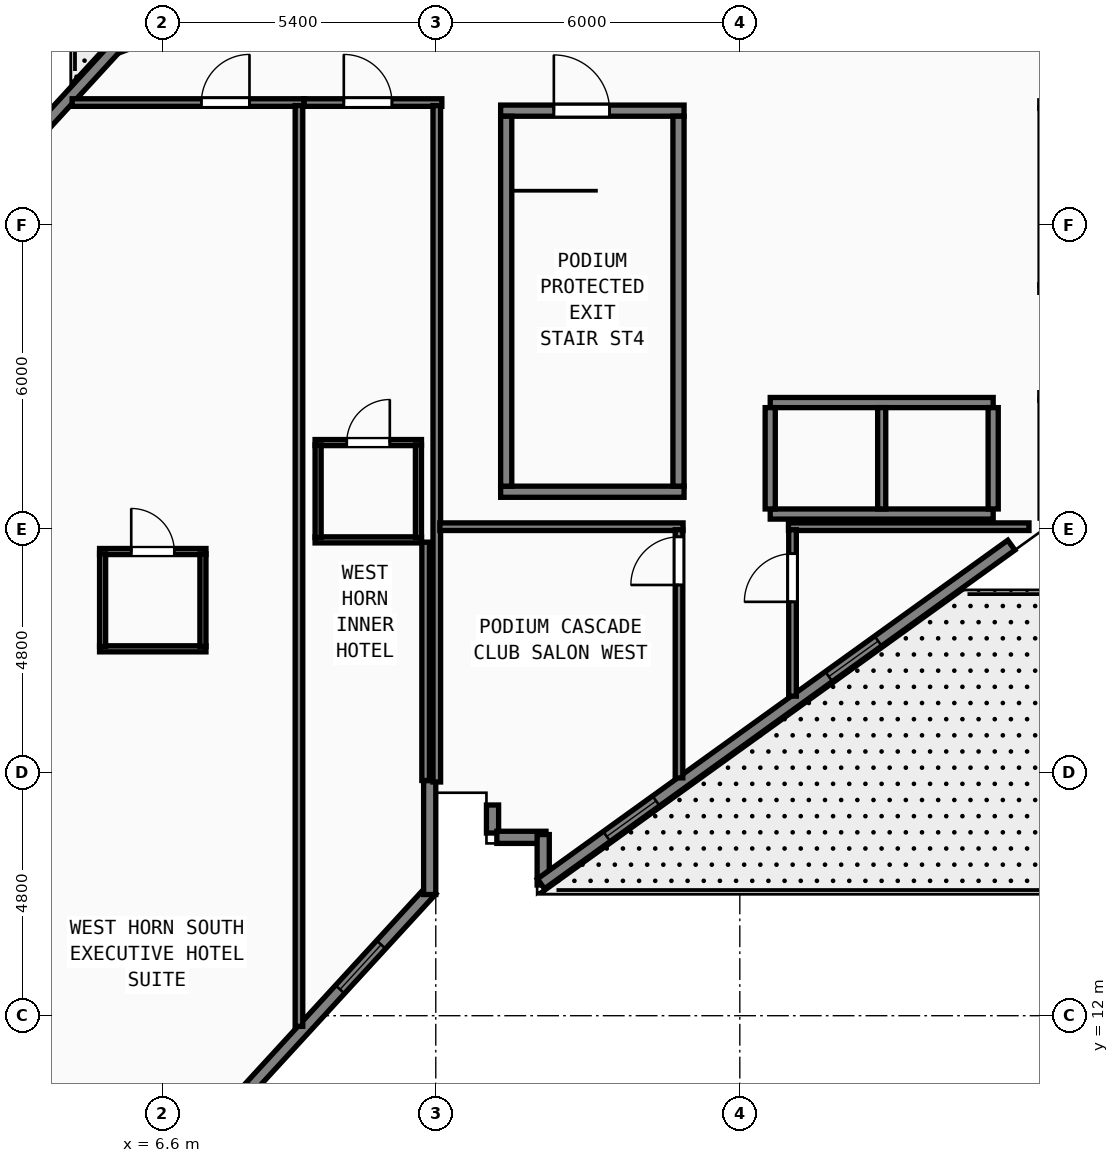
"""IFC4 building model, lengths in metres.
Left out: names, types, materials, properties, quantities, classifications, styles, units other than length and angle.
Written with IfcOpenShell. Run it as: python <this file> out.ifc"""

import sys

from ifc_helpers import new_model, si_unit, direction, frame, frame_2d, origin, origin_2d, place, context, subcontext, project, spatial, rectangle, hollow_rectangle, extrude, element, fill, save


model = new_model("IFC4")
c1 = context("Model", 3, precision=1e-05, world=origin(), true_north=direction((0.0, 1.0)))
c2 = subcontext(c1, "Body", "Model", "MODEL_VIEW")
j1 = project(units=[si_unit("LENGTHUNIT", "METRE"), si_unit("PLANEANGLEUNIT", "RADIAN")], contexts=[c1])
p1 = place(None, origin())
s1 = spatial("IfcSite", under=j1, at=p1, CompositionType="ELEMENT")
p2 = place(p1, origin())
s2 = spatial("IfcBuilding", under=s1, at=p2, CompositionType="ELEMENT")
p3 = place(p2, frame((0.0, 0.0, 24.0)))
s3 = spatial("IfcBuildingStorey", under=s2, at=p3, CompositionType="ELEMENT", Elevation=24.0)
p4 = place(p3, frame((13.28, 29.86, 0.0), z_axis=(0.0, 0.0, 1.0), x_axis=(1.0, 0.0, 0.0)))
e1 = element("IfcWall", 1, at=p4, inside=s3, PredefinedType="SHEAR", context=c2, shape_type="SweptSolid", body=[
    extrude(rectangle(XDim=3.62, YDim=0.22, at=frame_2d((1.81, 0.0))), origin(), (0.0, 0.0, 1.0), 3.6),
])
p5 = place(p4, frame((1.05, 0.0, 0.0)))
e2 = element("IfcOpeningElement", 2, at=p5, cuts=e1, PredefinedType="OPENING", context=c2, shape_type="SweptSolid", body=[
    extrude(rectangle(XDim=1.1, YDim=2.15, at=frame_2d((0.55, 1.075))), frame((0.0, 0.12, 0.0), z_axis=(0.0, -1.0, 0.0), x_axis=(1.0, 0.0, 0.0)), (0.0, 0.0, 1.0), 0.24),
])
p6 = place(p3, frame((13.28, 22.34, 0.0), z_axis=(0.0, 0.0, 1.0), x_axis=(1.0, 0.0, 0.0)))
e3 = element("IfcWall", 3, at=p6, inside=s3, PredefinedType="SHEAR", context=c2, shape_type="SweptSolid", body=[
    extrude(rectangle(XDim=3.62, YDim=0.22, at=frame_2d((1.81, 0.0))), origin(), (0.0, 0.0, 1.0), 3.6),
])
for number, where, z_axis, x_axis in (
    (4, (13.39, 22.45, 0.0), (0.0, 0.0, 1.0), (0.0, 1.0, 0.0)),
    (5, (16.79, 22.45, 0.0), (0.0, 0.0, 1.0), (0.0, 1.0, 0.0)),
):
    element("IfcWall", number, at=place(p3, frame(where, z_axis=z_axis, x_axis=x_axis)), inside=s3, PredefinedType="SHEAR", context=c2, shape_type="SweptSolid", body=[
        extrude(rectangle(XDim=7.3, YDim=0.22, at=frame_2d((3.65, 0.0))), origin(), (0.0, 0.0, 1.0), 3.6),
    ])
for number, where, z_axis, x_axis in (
    (6, (24.0, 21.6, 0.0), (0.0, 0.0, 1.0), (1.0, 0.0, 0.0)),
    (7, (12.6, 16.8, 0.0), (0.0, 0.0, 1.0), (1.0, 0.0, 0.0)),
    (8, (12.6, 27.6, 0.0), (0.0, 0.0, 1.0), (1.0, 0.0, 0.0)),
):
    element("IfcColumn", number, at=place(p3, frame(where, z_axis=z_axis, x_axis=x_axis)), inside=s3, PredefinedType="COLUMN", context=c2, shape_type="SweptSolid", body=[
        extrude(hollow_rectangle(XDim=1.3, YDim=1.3, WallThickness=0.048, at=origin_2d()), origin(), (0.0, 0.0, 1.0), 3.8),
    ])
for number, where, z_axis, x_axis in (
    (9, (6.0, 17.4, 0.0), (0.0, 0.0, 1.0), (1.0, 0.0, 0.0)),
    (10, (6.0, 27.6, 0.0), (0.0, 0.0, 1.0), (1.0, 0.0, 0.0)),
):
    element("IfcColumn", number, at=place(p3, frame(where, z_axis=z_axis, x_axis=x_axis)), inside=s3, PredefinedType="COLUMN", context=c2, shape_type="SweptSolid", body=[
        extrude(hollow_rectangle(XDim=1.15, YDim=1.15, WallThickness=0.042, at=origin_2d()), origin(), (0.0, 0.0, 1.0), 3.8),
    ])
for number, where, z_axis, x_axis in (
    (11, (24.0, 27.6, -0.26), (0.0, 0.0, 1.0), (1.0, 0.0, 0.0)),
    (12, (18.3, 19.2, -0.26), (0.0, 0.0, 1.0), (1.0, 0.0, 0.0)),
    (13, (9.3, 17.1, -0.26), (0.0, 0.0, 1.0), (1.0, 0.0, 0.0)),
    (14, (9.3, 27.6, -0.26), (0.0, 0.0, 1.0), (1.0, 0.0, 0.0)),
):
    element("IfcColumn", number, at=place(p3, frame(where, z_axis=z_axis, x_axis=x_axis)), inside=s3, PredefinedType="COLUMN", context=c2, shape_type="SweptSolid", body=[
        extrude(hollow_rectangle(XDim=1.0, YDim=1.0, WallThickness=0.038, at=origin_2d()), origin(), (0.0, 0.0, 1.0), 4.06),
    ])
p7 = place(p3, frame((5.377, 7.361, 0.0), z_axis=(0.0, 0.0, 1.0), x_axis=(0.676129143807, 0.736783130165, 0.0)))
e15 = element("IfcWall", 15, at=p7, inside=s3, PredefinedType="SOLIDWALL", context=c2, shape_type="SweptSolid", body=[
    extrude(rectangle(XDim=9.672, YDim=0.24, at=frame_2d((4.836, 0.0))), origin(), (0.0, 0.0, 1.0), 3.6),
])
p8 = place(p7, frame((1.6, 0.0, 0.85)))
e16 = element("IfcOpeningElement", 16, at=p8, cuts=e15, PredefinedType="OPENING", context=c2, shape_type="SweptSolid", body=[
    extrude(rectangle(XDim=1.2, YDim=1.85, at=frame_2d((0.6, 0.925))), frame((0.0, 0.13, 0.0), z_axis=(0.0, -1.0, 0.0), x_axis=(1.0, 0.0, 0.0)), (0.0, 0.0, 1.0), 0.26),
])
p9 = place(p7, frame((7.0, 0.0, 0.85)))
e17 = element("IfcOpeningElement", 17, at=p9, cuts=e15, PredefinedType="OPENING", context=c2, shape_type="SweptSolid", body=[
    extrude(rectangle(XDim=1.2, YDim=1.85, at=frame_2d((0.6, 0.925))), frame((0.0, 0.13, 0.0), z_axis=(0.0, -1.0, 0.0), x_axis=(1.0, 0.0, 0.0)), (0.0, 0.0, 1.0), 0.26),
])
p10 = place(p3, frame((11.88, 14.392, 0.0), z_axis=(0.0, 0.0, 1.0), x_axis=(0.0, 1.0, 0.0)))
e18 = element("IfcWall", 18, at=p10, inside=s3, PredefinedType="SOLIDWALL", context=c2, shape_type="SweptSolid", body=[
    extrude(rectangle(XDim=2.248, YDim=0.24, at=frame_2d((1.124, 0.0))), origin(), (0.0, 0.0, 1.0), 3.6),
])
p11 = place(p3, frame((13.12, 16.158, 0.0), z_axis=(0.0, 0.0, 1.0), x_axis=(0.0, -1.0, 0.0)))
e19 = element("IfcWall", 19, at=p11, inside=s3, PredefinedType="SOLIDWALL", context=c2, shape_type="SweptSolid", body=[
    extrude(rectangle(XDim=0.553, YDim=0.24, at=frame_2d((0.276, 0.0))), origin(), (0.0, 0.0, 1.0), 3.6),
])
p12 = place(p3, frame((13.205, 15.52, 0.0), z_axis=(0.0, 0.0, 1.0), x_axis=(1.0, 0.0, 0.0)))
e20 = element("IfcWall", 20, at=p12, inside=s3, PredefinedType="SOLIDWALL", context=c2, shape_type="SweptSolid", body=[
    extrude(rectangle(XDim=0.97, YDim=0.24, at=frame_2d((0.485, 0.0))), origin(), (0.0, 0.0, 1.0), 3.6),
])
p13 = place(p3, frame((14.12, 15.575, 0.0), z_axis=(0.0, 0.0, 1.0), x_axis=(0.0, -1.0, 0.0)))
e21 = element("IfcWall", 21, at=p13, inside=s3, PredefinedType="SOLIDWALL", context=c2, shape_type="SweptSolid", body=[
    extrude(rectangle(XDim=0.996, YDim=0.24, at=frame_2d((0.498, 0.0))), origin(), (0.0, 0.0, 1.0), 3.6),
])
p14 = place(p3, frame((14.075, 14.602, 0.0), z_axis=(0.0, 0.0, 1.0), x_axis=(0.811535555989, 0.584303038984, 0.0)))
e22 = element("IfcWall", 22, at=p14, inside=s3, PredefinedType="SOLIDWALL", context=c2, shape_type="SweptSolid", body=[
    extrude(rectangle(XDim=11.438, YDim=0.24, at=frame_2d((5.719, 0.0))), origin(), (0.0, 0.0, 1.0), 3.097),
])
p15 = place(p14, frame((1.6, 0.0, 0.85)))
e23 = element("IfcOpeningElement", 23, at=p15, cuts=e22, PredefinedType="OPENING", context=c2, shape_type="SweptSolid", body=[
    extrude(rectangle(XDim=1.2, YDim=1.85, at=frame_2d((0.6, 0.925))), frame((0.0, 0.13, 0.0), z_axis=(0.0, -1.0, 0.0), x_axis=(1.0, 0.0, 0.0)), (0.0, 0.0, 1.0), 0.26),
])
p16 = place(p14, frame((7.0, 0.0, 0.85)))
e24 = element("IfcOpeningElement", 24, at=p16, cuts=e22, PredefinedType="OPENING", context=c2, shape_type="SweptSolid", body=[
    extrude(rectangle(XDim=1.2, YDim=1.85, at=frame_2d((0.6, 0.925))), frame((0.0, 0.13, 0.0), z_axis=(0.0, -1.0, 0.0), x_axis=(1.0, 0.0, 0.0)), (0.0, 0.0, 1.0), 0.26),
])
p17 = place(p3, frame((12.171, 33.536, 0.0), z_axis=(0.0, 0.0, 1.0), x_axis=(-0.936327744176, -0.351127263946, 0.0)))
e25 = element("IfcWall", 25, at=p17, inside=s3, PredefinedType="SOLIDWALL", context=c2, shape_type="SweptSolid", body=[
    extrude(rectangle(XDim=7.0, YDim=0.24, at=frame_2d((3.5, 0.0))), origin(), (0.0, 0.0, 1.0), 3.6),
])
p18 = place(p17, frame((1.6, 0.0, 0.85)))
e26 = element("IfcOpeningElement", 26, at=p18, cuts=e25, PredefinedType="OPENING", context=c2, shape_type="SweptSolid", body=[
    extrude(rectangle(XDim=1.2, YDim=1.85, at=frame_2d((0.6, 0.925))), frame((0.0, 0.13, 0.0), z_axis=(0.0, -1.0, 0.0), x_axis=(1.0, 0.0, 0.0)), (0.0, 0.0, 1.0), 0.26),
])
p19 = place(p3, frame((5.706, 31.138, 0.0), z_axis=(0.0, 0.0, 1.0), x_axis=(-0.675758228752, -0.737123338577, 0.0)))
e27 = element("IfcWall", 27, at=p19, inside=s3, PredefinedType="SOLIDWALL", context=c2, shape_type="SweptSolid", body=[
    extrude(rectangle(XDim=3.29, YDim=0.24, at=frame_2d((1.645, 0.0))), origin(), (0.0, 0.0, 1.0), 3.6),
])
for number, where, z_axis, x_axis in (
    (28, (18.6, 24.1, 0.0), (0.0, 0.0, 1.0), (1.0, 0.0, 0.0)),
    (29, (18.6, 21.9, 0.0), (0.0, 0.0, 1.0), (1.0, 0.0, 0.0)),
):
    element("IfcWall", number, at=place(p3, frame(where, z_axis=z_axis, x_axis=x_axis)), inside=s3, PredefinedType="SOLIDWALL", context=c2, shape_type="SweptSolid", body=[
        extrude(rectangle(XDim=4.4, YDim=0.2, at=frame_2d((2.2, 0.0))), origin(), (0.0, 0.0, 1.0), 3.6),
    ])
for number, where, z_axis, x_axis in (
    (30, (18.6, 22.0, 0.0), (0.0, 0.0, 1.0), (0.0, 1.0, 0.0)),
    (31, (23.0, 22.0, 0.0), (0.0, 0.0, 1.0), (0.0, 1.0, 0.0)),
):
    element("IfcWall", number, at=place(p3, frame(where, z_axis=z_axis, x_axis=x_axis)), inside=s3, PredefinedType="SOLIDWALL", context=c2, shape_type="SweptSolid", body=[
        extrude(rectangle(XDim=2.0, YDim=0.2, at=frame_2d((1.0, 0.0))), origin(), (0.0, 0.0, 1.0), 3.6),
    ])
p20 = place(p3, frame((20.8, 22.0, 0.0), z_axis=(0.0, 0.0, 1.0), x_axis=(0.0, 1.0, 0.0)))
e32 = element("IfcWall", 32, at=p20, inside=s3, PredefinedType="SOLIDWALL", context=c2, shape_type="SweptSolid", body=[
    extrude(rectangle(XDim=2.0, YDim=0.16, at=frame_2d((1.0, 0.0))), origin(), (0.0, 0.0, 1.0), 3.6),
])
p21 = place(p3, frame((4.823, 30.02, 0.0), z_axis=(0.0, 0.0, 1.0), x_axis=(1.0, 0.0, 0.0)))
e33 = element("IfcWall", 33, at=p21, inside=s3, PredefinedType="PARTITIONING", context=c2, shape_type="SweptSolid", body=[
    extrude(rectangle(XDim=4.576, YDim=0.15, at=frame_2d((2.288, 0.0))), origin(), (0.0, 0.0, 1.0), 3.6),
])
p22 = place(p21, frame((3.5, 0.0, 0.0), z_axis=(0.0, 0.0, 1.0), x_axis=(-1.0, 0.0, 0.0)))
e34 = element("IfcOpeningElement", 34, at=p22, cuts=e33, PredefinedType="OPENING", context=c2, shape_type="SweptSolid", body=[
    extrude(rectangle(XDim=0.95, YDim=2.18, at=frame_2d((0.475, 1.09))), frame((0.0, 0.085, 0.0), z_axis=(0.0, -1.0, 0.0), x_axis=(1.0, 0.0, 0.0)), (0.0, 0.0, 1.0), 0.17),
])
p23 = place(p3, frame((9.3, 11.791, 0.0), z_axis=(0.0, 0.0, 1.0), x_axis=(0.0, 1.0, 0.0)))
e35 = element("IfcWall", 35, at=p23, inside=s3, PredefinedType="PARTITIONING", context=c2, shape_type="SweptSolid", body=[
    extrude(rectangle(XDim=18.169, YDim=0.15, at=frame_2d((9.085, 0.0))), origin(), (0.0, 0.0, 1.0), 3.6),
])
p24 = place(p3, frame((5.365, 21.16, 0.0), z_axis=(0.0, 0.0, 1.0), x_axis=(1.0, 0.0, 0.0)))
e36 = element("IfcWall", 36, at=p24, inside=s3, PredefinedType="PARTITIONING", context=c2, shape_type="SweptSolid", body=[
    extrude(rectangle(XDim=2.1, YDim=0.12, at=frame_2d((1.05, 0.0))), origin(), (0.0, 0.0, 1.0), 3.6),
])
p25 = place(p24, frame((1.475, 0.0, 0.0), z_axis=(0.0, 0.0, 1.0), x_axis=(-1.0, 0.0, 0.0)))
e37 = element("IfcOpeningElement", 37, at=p25, cuts=e36, PredefinedType="OPENING", context=c2, shape_type="SweptSolid", body=[
    extrude(rectangle(XDim=0.85, YDim=2.1, at=frame_2d((0.425, 1.05))), frame((0.0, 0.07, 0.0), z_axis=(0.0, -1.0, 0.0), x_axis=(1.0, 0.0, 0.0)), (0.0, 0.0, 1.0), 0.14),
])
p26 = place(p3, frame((5.365, 19.24, 0.0), z_axis=(0.0, 0.0, 1.0), x_axis=(1.0, 0.0, 0.0)))
e38 = element("IfcWall", 38, at=p26, inside=s3, PredefinedType="PARTITIONING", context=c2, shape_type="SweptSolid", body=[
    extrude(rectangle(XDim=2.1, YDim=0.12, at=frame_2d((1.05, 0.0))), origin(), (0.0, 0.0, 1.0), 3.6),
])
for number, where, z_axis, x_axis in (
    (39, (5.425, 19.285, 0.0), (0.0, 0.0, 1.0), (0.0, 1.0, 0.0)),
    (40, (7.405, 19.285, 0.0), (0.0, 0.0, 1.0), (0.0, 1.0, 0.0)),
):
    element("IfcWall", number, at=place(p3, frame(where, z_axis=z_axis, x_axis=x_axis)), inside=s3, PredefinedType="PARTITIONING", context=c2, shape_type="SweptSolid", body=[
        extrude(rectangle(XDim=1.83, YDim=0.12, at=frame_2d((0.915, 0.0))), origin(), (0.0, 0.0, 1.0), 3.6),
    ])
p27 = place(p3, frame((9.402, 30.02, 0.0), z_axis=(0.0, 0.0, 1.0), x_axis=(1.0, 0.0, 0.0)))
e41 = element("IfcWall", 41, at=p27, inside=s3, PredefinedType="PARTITIONING", context=c2, shape_type="SweptSolid", body=[
    extrude(rectangle(XDim=2.718, YDim=0.15, at=frame_2d((1.359, 0.0))), origin(), (0.0, 0.0, 1.0), 3.6),
])
p28 = place(p27, frame((1.733, 0.0, 0.0), z_axis=(0.0, 0.0, 1.0), x_axis=(-1.0, 0.0, 0.0)))
e42 = element("IfcOpeningElement", 42, at=p28, cuts=e41, PredefinedType="OPENING", context=c2, shape_type="SweptSolid", body=[
    extrude(rectangle(XDim=0.95, YDim=2.15, at=frame_2d((0.475, 1.075))), frame((0.0, 0.085, 0.0), z_axis=(0.0, -1.0, 0.0), x_axis=(1.0, 0.0, 0.0)), (0.0, 0.0, 1.0), 0.17),
])
p29 = place(p3, frame((12.02, 16.612, 0.0), z_axis=(0.0, 0.0, 1.0), x_axis=(0.0, 1.0, 0.0)))
e43 = element("IfcWall", 43, at=p29, inside=s3, PredefinedType="PARTITIONING", context=c2, shape_type="SweptSolid", body=[
    extrude(rectangle(XDim=13.348, YDim=0.15, at=frame_2d((6.674, 0.0))), origin(), (0.0, 0.0, 1.0), 3.6),
])
p30 = place(p3, frame((9.618, 23.31, 0.0), z_axis=(0.0, 0.0, 1.0), x_axis=(1.0, 0.0, 0.0)))
e44 = element("IfcWall", 44, at=p30, inside=s3, PredefinedType="PARTITIONING", context=c2, shape_type="SweptSolid", body=[
    extrude(rectangle(XDim=2.1, YDim=0.12, at=frame_2d((1.05, 0.0))), origin(), (0.0, 0.0, 1.0), 3.6),
])
p31 = place(p30, frame((1.475, 0.0, 0.0), z_axis=(0.0, 0.0, 1.0), x_axis=(-1.0, 0.0, 0.0)))
e45 = element("IfcOpeningElement", 45, at=p31, cuts=e44, PredefinedType="OPENING", context=c2, shape_type="SweptSolid", body=[
    extrude(rectangle(XDim=0.85, YDim=2.1, at=frame_2d((0.425, 1.05))), frame((0.0, 0.07, 0.0), z_axis=(0.0, -1.0, 0.0), x_axis=(1.0, 0.0, 0.0)), (0.0, 0.0, 1.0), 0.14),
])
p32 = place(p3, frame((9.618, 21.39, 0.0), z_axis=(0.0, 0.0, 1.0), x_axis=(1.0, 0.0, 0.0)))
e46 = element("IfcWall", 46, at=p32, inside=s3, PredefinedType="PARTITIONING", context=c2, shape_type="SweptSolid", body=[
    extrude(rectangle(XDim=2.1, YDim=0.12, at=frame_2d((1.05, 0.0))), origin(), (0.0, 0.0, 1.0), 3.6),
])
for number, where, z_axis, x_axis in (
    (47, (9.678, 21.435, 0.0), (0.0, 0.0, 1.0), (0.0, 1.0, 0.0)),
    (48, (11.658, 21.435, 0.0), (0.0, 0.0, 1.0), (0.0, 1.0, 0.0)),
):
    element("IfcWall", number, at=place(p3, frame(where, z_axis=z_axis, x_axis=x_axis)), inside=s3, PredefinedType="PARTITIONING", context=c2, shape_type="SweptSolid", body=[
        extrude(rectangle(XDim=1.83, YDim=0.12, at=frame_2d((0.915, 0.0))), origin(), (0.0, 0.0, 1.0), 3.6),
    ])
p33 = place(p3, frame((18.96, 21.65, 0.0), z_axis=(0.0, 0.0, 1.0), x_axis=(1.0, 0.0, 0.0)))
e49 = element("IfcWall", 49, at=p33, inside=s3, PredefinedType="PARTITIONING", context=c2, shape_type="SweptSolid", body=[
    extrude(rectangle(XDim=4.747, YDim=0.15, at=frame_2d((2.373, 0.0))), origin(), (0.0, 0.0, 1.0), 3.6),
])
p34 = place(p3, frame((19.04, 18.306, 0.0), z_axis=(0.0, 0.0, 1.0), x_axis=(0.0, 1.0, 0.0)))
e50 = element("IfcWall", 50, at=p34, inside=s3, PredefinedType="PARTITIONING", context=c2, shape_type="SweptSolid", body=[
    extrude(rectangle(XDim=3.284, YDim=0.15, at=frame_2d((1.642, 0.0))), origin(), (0.0, 0.0, 1.0), 3.6),
])
p35 = place(p34, frame((1.861, 0.0, 0.0)))
e51 = element("IfcOpeningElement", 51, at=p35, cuts=e50, PredefinedType="OPENING", context=c2, shape_type="SweptSolid", body=[
    extrude(rectangle(XDim=0.95, YDim=2.12, at=frame_2d((0.475, 1.06))), frame((0.0, 0.085, 0.0), z_axis=(0.0, -1.0, 0.0), x_axis=(1.0, 0.0, 0.0)), (0.0, 0.0, 1.0), 0.17),
])
p36 = place(p3, frame((12.08, 21.65, 0.0), z_axis=(0.0, 0.0, 1.0), x_axis=(1.0, 0.0, 0.0)))
e52 = element("IfcWall", 52, at=p36, inside=s3, PredefinedType="PARTITIONING", context=c2, shape_type="SweptSolid", body=[
    extrude(rectangle(XDim=4.8, YDim=0.15, at=frame_2d((2.4, 0.0))), origin(), (0.0, 0.0, 1.0), 3.6),
])
p37 = place(p3, frame((11.8, 16.642, 0.0), z_axis=(0.0, 0.0, 1.0), x_axis=(0.0, 1.0, 0.0)))
e53 = element("IfcWall", 53, at=p37, inside=s3, PredefinedType="PARTITIONING", context=c2, shape_type="SweptSolid", body=[
    extrude(rectangle(XDim=4.703, YDim=0.15, at=frame_2d((2.352, 0.0))), origin(), (0.0, 0.0, 1.0), 3.6),
])
p38 = place(p3, frame((16.8, 16.693, 0.0), z_axis=(0.0, 0.0, 1.0), x_axis=(0.0, 1.0, 0.0)))
e54 = element("IfcWall", 54, at=p38, inside=s3, PredefinedType="PARTITIONING", context=c2, shape_type="SweptSolid", body=[
    extrude(rectangle(XDim=4.897, YDim=0.15, at=frame_2d((2.448, 0.0))), origin(), (0.0, 0.0, 1.0), 3.6),
])
p39 = place(p38, frame((4.757, 0.0, 0.0), z_axis=(0.0, 0.0, 1.0), x_axis=(-1.0, 0.0, 0.0)))
e55 = element("IfcOpeningElement", 55, at=p39, cuts=e54, PredefinedType="OPENING", context=c2, shape_type="SweptSolid", body=[
    extrude(rectangle(XDim=0.95, YDim=2.12, at=frame_2d((0.475, 1.06))), frame((0.0, 0.085, 0.0), z_axis=(0.0, -1.0, 0.0), x_axis=(1.0, 0.0, 0.0)), (0.0, 0.0, 1.0), 0.17),
])
p40 = place(p9, origin())
e56 = element("IfcWindow", 56, at=p40, inside=s3, PartitioningType="SINGLE_PANEL", PredefinedType="WINDOW", context=c2, shape_type="SweptSolid", body=[
    extrude(rectangle(XDim=1.2, YDim=1.85, at=frame_2d((0.6, 0.925))), frame((0.0, 0.03, 0.0), z_axis=(0.0, -1.0, 0.0), x_axis=(1.0, 0.0, 0.0)), (0.0, 0.0, 1.0), 0.06),
])
fill(e17, e56)
p41 = place(p15, origin())
e57 = element("IfcWindow", 57, at=p41, inside=s3, PartitioningType="SINGLE_PANEL", PredefinedType="WINDOW", context=c2, shape_type="SweptSolid", body=[
    extrude(rectangle(XDim=1.2, YDim=1.85, at=frame_2d((0.6, 0.925))), frame((0.0, 0.03, 0.0), z_axis=(0.0, -1.0, 0.0), x_axis=(1.0, 0.0, 0.0)), (0.0, 0.0, 1.0), 0.06),
])
fill(e23, e57)
p42 = place(p16, origin())
e58 = element("IfcWindow", 58, at=p42, inside=s3, PartitioningType="SINGLE_PANEL", PredefinedType="WINDOW", context=c2, shape_type="SweptSolid", body=[
    extrude(rectangle(XDim=1.2, YDim=1.85, at=frame_2d((0.6, 0.925))), frame((0.0, 0.03, 0.0), z_axis=(0.0, -1.0, 0.0), x_axis=(1.0, 0.0, 0.0)), (0.0, 0.0, 1.0), 0.06),
])
fill(e24, e58)
p43 = place(p5, origin())
e59 = element("IfcDoor", 59, at=p43, inside=s3, OperationType="SINGLE_SWING_LEFT", PredefinedType="DOOR", context=c2, shape_type="SweptSolid", body=[
    extrude(rectangle(XDim=1.1, YDim=2.15, at=frame_2d((0.55, 1.075))), frame((0.0, 0.025, 0.0), z_axis=(0.0, -1.0, 0.0), x_axis=(1.0, 0.0, 0.0)), (0.0, 0.0, 1.0), 0.05),
])
fill(e2, e59)
p44 = place(p22, origin())
e60 = element("IfcDoor", 60, at=p44, inside=s3, OperationType="SINGLE_SWING_LEFT", PredefinedType="DOOR", context=c2, shape_type="SweptSolid", body=[
    extrude(rectangle(XDim=0.95, YDim=2.18, at=frame_2d((0.475, 1.09))), frame((0.0, 0.025, 0.0), z_axis=(0.0, -1.0, 0.0), x_axis=(1.0, 0.0, 0.0)), (0.0, 0.0, 1.0), 0.05),
])
fill(e34, e60)
p45 = place(p25, origin())
e61 = element("IfcDoor", 61, at=p45, inside=s3, OperationType="SINGLE_SWING_RIGHT", PredefinedType="DOOR", context=c2, shape_type="SweptSolid", body=[
    extrude(rectangle(XDim=0.85, YDim=2.1, at=frame_2d((0.425, 1.05))), frame((0.0, 0.025, 0.0), z_axis=(0.0, -1.0, 0.0), x_axis=(1.0, 0.0, 0.0)), (0.0, 0.0, 1.0), 0.05),
])
fill(e37, e61)
p46 = place(p28, origin())
e62 = element("IfcDoor", 62, at=p46, inside=s3, OperationType="SINGLE_SWING_RIGHT", PredefinedType="DOOR", context=c2, shape_type="SweptSolid", body=[
    extrude(rectangle(XDim=0.95, YDim=2.15, at=frame_2d((0.475, 1.075))), frame((0.0, 0.025, 0.0), z_axis=(0.0, -1.0, 0.0), x_axis=(1.0, 0.0, 0.0)), (0.0, 0.0, 1.0), 0.05),
])
fill(e42, e62)
p47 = place(p31, origin())
e63 = element("IfcDoor", 63, at=p47, inside=s3, OperationType="SINGLE_SWING_LEFT", PredefinedType="DOOR", context=c2, shape_type="SweptSolid", body=[
    extrude(rectangle(XDim=0.85, YDim=2.1, at=frame_2d((0.425, 1.05))), frame((0.0, 0.025, 0.0), z_axis=(0.0, -1.0, 0.0), x_axis=(1.0, 0.0, 0.0)), (0.0, 0.0, 1.0), 0.05),
])
fill(e45, e63)
p48 = place(p35, origin())
e64 = element("IfcDoor", 64, at=p48, inside=s3, OperationType="SINGLE_SWING_LEFT", PredefinedType="DOOR", context=c2, shape_type="SweptSolid", body=[
    extrude(rectangle(XDim=0.95, YDim=2.12, at=frame_2d((0.475, 1.06))), frame((0.0, 0.025, 0.0), z_axis=(0.0, -1.0, 0.0), x_axis=(1.0, 0.0, 0.0)), (0.0, 0.0, 1.0), 0.05),
])
fill(e51, e64)
p49 = place(p39, origin())
e65 = element("IfcDoor", 65, at=p49, inside=s3, OperationType="SINGLE_SWING_RIGHT", PredefinedType="DOOR", context=c2, shape_type="SweptSolid", body=[
    extrude(rectangle(XDim=0.95, YDim=2.12, at=frame_2d((0.475, 1.06))), frame((0.0, 0.025, 0.0), z_axis=(0.0, -1.0, 0.0), x_axis=(1.0, 0.0, 0.0)), (0.0, 0.0, 1.0), 0.05),
])
fill(e55, e65)
save(model, sys.argv[1])
